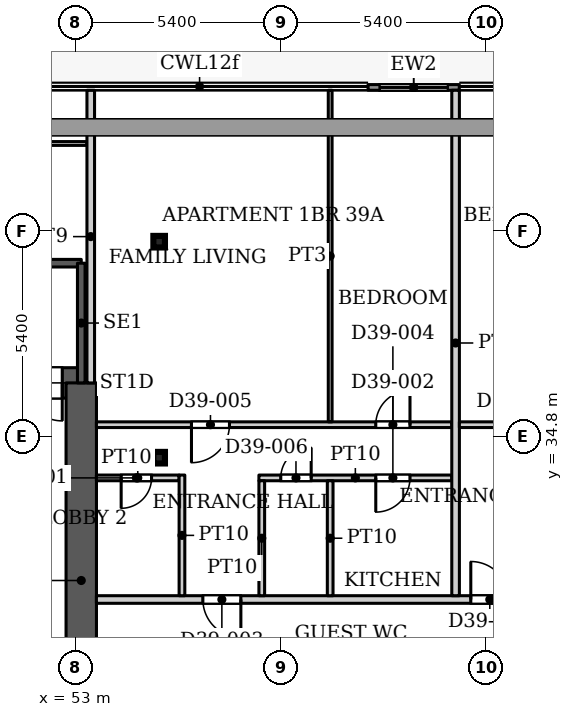
"""IFC4 building model, lengths in metres.
Left out: names, types, materials, properties, quantities, classifications, styles, units other than length and angle.
Written with IfcOpenShell. Run it as: python <this file> out.ifc"""

import sys

from ifc_helpers import new_model, si_unit, direction, frame, frame_2d, origin, origin_2d, place, context, subcontext, project, spatial, rectangle, hollow_rectangle, extrude, source, transform, mapped, element, fill, save


model = new_model("IFC4")
c1 = context("Model", 3, precision=1e-05, world=origin(), true_north=direction((0.0, 1.0)))
c2 = subcontext(c1, "Body", "Model", "MODEL_VIEW")
j1 = project(units=[si_unit("LENGTHUNIT", "METRE"), si_unit("PLANEANGLEUNIT", "RADIAN")], contexts=[c1])
p1 = place(None, origin())
s1 = spatial("IfcSite", under=j1, at=p1, CompositionType="ELEMENT")
p2 = place(p1, origin())
s2 = spatial("IfcBuilding", under=s1, at=p2, CompositionType="ELEMENT")
p3 = place(p2, frame((0.0, 0.0, 168.2)))
s3 = spatial("IfcBuildingStorey", under=s2, at=p3, CompositionType="ELEMENT", Elevation=168.2)
for number, where, z_axis, x_axis in (
    (1, (55.2, 34.232, 0.0), (0.0, 0.0, 1.0), (1.0, 0.0, 0.0)),
    (2, (55.2, 39.916, 0.0), (0.0, 0.0, 1.0), (1.0, 0.0, 0.0)),
):
    element("IfcColumn", number, at=place(p3, frame(where, z_axis=z_axis, x_axis=x_axis)), inside=s3, PredefinedType="COLUMN", context=c2, shape_type="SweptSolid", body=[
        extrude(hollow_rectangle(XDim=0.305, YDim=0.305, WallThickness=0.016, InnerFilletRadius=0.016, OuterFilletRadius=0.032, at=origin_2d()), origin(), (0.0, 0.0, 1.0), 3.9),
    ])
p4 = place(p3, frame((34.75, 36.2, 0.0), z_axis=(0.0, 0.0, 1.0), x_axis=(1.0, 0.0, 0.0)))
e3 = element("IfcWall", 3, at=p4, inside=s3, PredefinedType="SHEAR", context=c2, shape_type="SweptSolid", body=[
    extrude(rectangle(XDim=18.4, YDim=0.8, at=frame_2d((9.2, 0.0))), origin(), (0.0, 0.0, 1.0), 3.9),
])
p5 = place(p4, frame((16.9, 0.0, 0.0)))
e4 = element("IfcOpeningElement", 4, at=p5, cuts=e3, PredefinedType="OPENING", context=c2, shape_type="SweptSolid", body=[
    extrude(rectangle(XDim=1.0, YDim=2.2, at=frame_2d((0.5, 1.1))), frame((0.0, 0.41, 0.0), z_axis=(0.0, -1.0, 0.0), x_axis=(1.0, 0.0, 0.0)), (0.0, 0.0, 1.0), 0.82),
])
p6 = place(p3, frame((53.15, 25.8, 0.0), z_axis=(0.0, 0.0, 1.0), x_axis=(0.0, 1.0, 0.0)))
e5 = element("IfcWall", 5, at=p6, inside=s3, PredefinedType="SHEAR", context=c2, shape_type="SweptSolid", body=[
    extrude(rectangle(XDim=10.4, YDim=0.8, at=frame_2d((5.2, 0.0))), origin(), (0.0, 0.0, 1.0), 3.9),
])
p7 = place(p3, frame((60.697, 43.975, 0.0), z_axis=(0.0, 0.0, 1.0), x_axis=(1.0, 0.0, 0.0)))
e6 = element("IfcWall", 6, at=p7, inside=s3, PredefinedType="SOLIDWALL", context=c2, shape_type="SweptSolid", body=[
    extrude(rectangle(XDim=2.4, YDim=0.15, at=frame_2d((1.2, 0.0))), origin(), (0.0, 0.0, 1.0), 3.75),
])
p8 = place(p7, frame((0.3, 0.0, 0.0)))
e7 = element("IfcOpeningElement", 7, at=p8, cuts=e6, PredefinedType="OPENING", context=c2, shape_type="SweptSolid", body=[
    extrude(rectangle(XDim=1.8, YDim=2.4, at=frame_2d((0.9, 1.2))), frame((0.0, 0.085, 0.0), z_axis=(0.0, -1.0, 0.0), x_axis=(1.0, 0.0, 0.0)), (0.0, 0.0, 1.0), 0.17),
])
p9 = place(p3, frame((43.99, 39.35, 0.0), z_axis=(0.0, 0.0, 1.0), x_axis=(1.0, 0.0, 0.0)))
e8 = element("IfcWall", 8, at=p9, inside=s3, PredefinedType="SHEAR", context=c2, shape_type="SweptSolid", body=[
    extrude(rectangle(XDim=9.16, YDim=0.2, at=frame_2d((4.58, 0.0))), origin(), (0.0, 0.0, 1.0), 3.9),
])
p10 = place(p3, frame((53.15, 36.2, 0.0), z_axis=(0.0, 0.0, 1.0), x_axis=(0.0, 1.0, 0.0)))
e9 = element("IfcWall", 9, at=p10, inside=s3, PredefinedType="SHEAR", context=c2, shape_type="SweptSolid", body=[
    extrude(rectangle(XDim=3.15, YDim=0.2, at=frame_2d((1.575, 0.0))), origin(), (0.0, 0.0, 1.0), 3.9),
])
p11 = place(p3, frame((38.399, 42.5, 0.0), z_axis=(0.0, 0.0, 1.0), x_axis=(1.0, 0.0, 0.0)))
e10 = element("IfcWall", 10, at=p11, inside=s3, PredefinedType="PARTITIONING", context=c2, shape_type="SweptSolid", body=[
    extrude(rectangle(XDim=14.901, YDim=0.1, at=frame_2d((7.451, 0.0))), origin(), (0.0, 0.0, 1.0), 3.6),
])
p12 = place(p11, frame((6.801, 0.0, 0.0)))
e11 = element("IfcOpeningElement", 11, at=p12, cuts=e10, PredefinedType="OPENING", context=c2, shape_type="SweptSolid", body=[
    extrude(rectangle(XDim=1.0, YDim=2.1, at=frame_2d((0.5, 1.05))), frame((0.0, 0.06, 0.0), z_axis=(0.0, -1.0, 0.0), x_axis=(1.0, 0.0, 0.0)), (0.0, 0.0, 1.0), 0.12),
])
p13 = place(p3, frame((53.4, 36.199, 0.0), z_axis=(0.0, 0.0, 1.0), x_axis=(0.0, 1.0, 0.0)))
e12 = element("IfcWall", 12, at=p13, inside=s3, PredefinedType="PARTITIONING", context=c2, shape_type="SweptSolid", body=[
    extrude(rectangle(XDim=7.701, YDim=0.2, at=frame_2d((3.851, 0.0))), origin(), (0.0, 0.0, 1.0), 3.6),
])
p14 = place(p3, frame((53.549, 30.5, 0.0), z_axis=(0.0, 0.0, 1.0), x_axis=(1.0, 0.0, 0.0)))
e13 = element("IfcWall", 13, at=p14, inside=s3, PredefinedType="PARTITIONING", context=c2, shape_type="SweptSolid", body=[
    extrude(rectangle(XDim=39.151, YDim=0.2, at=frame_2d((19.575, 0.0))), origin(), (0.0, 0.0, 1.0), 3.6),
])
p15 = place(p14, frame((2.801, 0.0, 0.0)))
e14 = element("IfcOpeningElement", 14, at=p15, cuts=e13, PredefinedType="OPENING", context=c2, shape_type="SweptSolid", body=[
    extrude(rectangle(XDim=1.0, YDim=2.1, at=frame_2d((0.5, 1.05))), frame((0.0, 0.11, 0.0), z_axis=(0.0, -1.0, 0.0), x_axis=(1.0, 0.0, 0.0)), (0.0, 0.0, 1.0), 0.22),
])
p16 = place(p14, frame((9.851, 0.0, 0.0)))
e15 = element("IfcOpeningElement", 15, at=p16, cuts=e13, PredefinedType="OPENING", context=c2, shape_type="SweptSolid", body=[
    extrude(rectangle(XDim=1.0, YDim=2.1, at=frame_2d((0.5, 1.05))), frame((0.0, 0.11, 0.0), z_axis=(0.0, -1.0, 0.0), x_axis=(1.0, 0.0, 0.0)), (0.0, 0.0, 1.0), 0.22),
])
p17 = place(p14, frame((28.751, 0.0, 0.0)))
e16 = element("IfcOpeningElement", 16, at=p17, cuts=e13, PredefinedType="OPENING", context=c2, shape_type="SweptSolid", body=[
    extrude(rectangle(XDim=1.0, YDim=2.1, at=frame_2d((0.5, 1.05))), frame((0.0, 0.11, 0.0), z_axis=(0.0, -1.0, 0.0), x_axis=(1.0, 0.0, 0.0)), (0.0, 0.0, 1.0), 0.22),
])
p18 = place(p14, frame((32.651, 0.0, 0.0)))
e17 = element("IfcOpeningElement", 17, at=p18, cuts=e13, PredefinedType="OPENING", context=c2, shape_type="SweptSolid", body=[
    extrude(rectangle(XDim=1.0, YDim=2.1, at=frame_2d((0.5, 1.05))), frame((0.0, 0.11, 0.0), z_axis=(0.0, -1.0, 0.0), x_axis=(1.0, 0.0, 0.0)), (0.0, 0.0, 1.0), 0.22),
])
p19 = place(p3, frame((53.549, 33.7, 0.0), z_axis=(0.0, 0.0, 1.0), x_axis=(1.0, 0.0, 0.0)))
e18 = element("IfcWall", 18, at=p19, inside=s3, PredefinedType="PARTITIONING", context=c2, shape_type="SweptSolid", body=[
    extrude(rectangle(XDim=2.176, YDim=0.15, at=frame_2d((1.088, 0.0))), origin(), (0.0, 0.0, 1.0), 3.6),
])
p20 = place(p19, frame((0.651, 0.0, 0.0)))
e19 = element("IfcOpeningElement", 19, at=p20, cuts=e18, PredefinedType="OPENING", context=c2, shape_type="SweptSolid", body=[
    extrude(rectangle(XDim=0.8, YDim=2.1, at=frame_2d((0.4, 1.05))), frame((0.0, 0.085, 0.0), z_axis=(0.0, -1.0, 0.0), x_axis=(1.0, 0.0, 0.0)), (0.0, 0.0, 1.0), 0.17),
])
p21 = place(p3, frame((53.549, 35.1, 0.0), z_axis=(0.0, 0.0, 1.0), x_axis=(1.0, 0.0, 0.0)))
e20 = element("IfcWall", 20, at=p21, inside=s3, PredefinedType="PARTITIONING", context=c2, shape_type="SweptSolid", body=[
    extrude(rectangle(XDim=9.351, YDim=0.15, at=frame_2d((4.675, 0.0))), origin(), (0.0, 0.0, 1.0), 3.6),
])
p22 = place(p21, frame((7.351, 0.0, 0.0)))
e21 = element("IfcOpeningElement", 21, at=p22, cuts=e20, PredefinedType="OPENING", context=c2, shape_type="SweptSolid", body=[
    extrude(rectangle(XDim=0.9, YDim=2.1, at=frame_2d((0.45, 1.05))), frame((0.0, 0.085, 0.0), z_axis=(0.0, -1.0, 0.0), x_axis=(1.0, 0.0, 0.0)), (0.0, 0.0, 1.0), 0.17),
])
p23 = place(p21, frame((2.501, 0.0, 0.0)))
e22 = element("IfcOpeningElement", 22, at=p23, cuts=e20, PredefinedType="OPENING", context=c2, shape_type="SweptSolid", body=[
    extrude(rectangle(XDim=1.0, YDim=2.1, at=frame_2d((0.5, 1.05))), frame((0.0, 0.085, 0.0), z_axis=(0.0, -1.0, 0.0), x_axis=(1.0, 0.0, 0.0)), (0.0, 0.0, 1.0), 0.17),
])
p24 = place(p3, frame((55.8, 30.6, 0.0), z_axis=(0.0, 0.0, 1.0), x_axis=(0.0, 1.0, 0.0)))
e23 = element("IfcWall", 23, at=p24, inside=s3, PredefinedType="PARTITIONING", context=c2, shape_type="SweptSolid", body=[
    extrude(rectangle(XDim=3.175, YDim=0.15, at=frame_2d((1.587, 0.0))), origin(), (0.0, 0.0, 1.0), 3.6),
])
p25 = place(p3, frame((57.825, 33.7, 0.0), z_axis=(0.0, 0.0, 1.0), x_axis=(1.0, 0.0, 0.0)))
e24 = element("IfcWall", 24, at=p25, inside=s3, PredefinedType="PARTITIONING", context=c2, shape_type="SweptSolid", body=[
    extrude(rectangle(XDim=5.075, YDim=0.15, at=frame_2d((2.538, 0.0))), origin(), (0.0, 0.0, 1.0), 3.6),
])
p26 = place(p25, frame((3.075, 0.0, 0.0)))
e25 = element("IfcOpeningElement", 25, at=p26, cuts=e24, PredefinedType="OPENING", context=c2, shape_type="SweptSolid", body=[
    extrude(rectangle(XDim=0.9, YDim=2.1, at=frame_2d((0.45, 1.05))), frame((0.0, 0.085, 0.0), z_axis=(0.0, -1.0, 0.0), x_axis=(1.0, 0.0, 0.0)), (0.0, 0.0, 1.0), 0.17),
])
p27 = place(p25, frame((0.575, 0.0, 0.0)))
e26 = element("IfcOpeningElement", 26, at=p27, cuts=e24, PredefinedType="OPENING", context=c2, shape_type="SweptSolid", body=[
    extrude(rectangle(XDim=0.8, YDim=2.1, at=frame_2d((0.4, 1.05))), frame((0.0, 0.085, 0.0), z_axis=(0.0, -1.0, 0.0), x_axis=(1.0, 0.0, 0.0)), (0.0, 0.0, 1.0), 0.17),
])
for number, where, z_axis, x_axis in (
    (27, (57.9, 30.6, 0.0), (0.0, 0.0, 1.0), (0.0, 1.0, 0.0)),
    (28, (59.7, 30.6, 0.0), (0.0, 0.0, 1.0), (0.0, 1.0, 0.0)),
):
    element("IfcWall", number, at=place(p3, frame(where, z_axis=z_axis, x_axis=x_axis)), inside=s3, PredefinedType="PARTITIONING", context=c2, shape_type="SweptSolid", body=[
        extrude(rectangle(XDim=3.025, YDim=0.15, at=frame_2d((1.512, 0.0))), origin(), (0.0, 0.0, 1.0), 3.6),
    ])
p28 = place(p3, frame((59.7, 35.175, 0.0), z_axis=(0.0, 0.0, 1.0), x_axis=(0.0, 1.0, 0.0)))
e29 = element("IfcWall", 29, at=p28, inside=s3, PredefinedType="PARTITIONING", context=c2, shape_type="SweptSolid", body=[
    extrude(rectangle(XDim=8.725, YDim=0.1, at=frame_2d((4.362, 0.0))), origin(), (0.0, 0.0, 1.0), 3.6),
])
p29 = place(p3, frame((63.0, 30.6, 0.0), z_axis=(0.0, 0.0, 1.0), x_axis=(0.0, 1.0, 0.0)))
e30 = element("IfcWall", 30, at=p29, inside=s3, PredefinedType="PARTITIONING", context=c2, shape_type="SweptSolid", body=[
    extrude(rectangle(XDim=13.3, YDim=0.2, at=frame_2d((6.65, 0.0))), origin(), (0.0, 0.0, 1.0), 3.6),
])
p30 = place(p3, frame((63.1, 35.1, 0.0), z_axis=(0.0, 0.0, 1.0), x_axis=(1.0, 0.0, 0.0)))
e31 = element("IfcWall", 31, at=p30, inside=s3, PredefinedType="PARTITIONING", context=c2, shape_type="SweptSolid", body=[
    extrude(rectangle(XDim=12.1, YDim=0.15, at=frame_2d((6.05, 0.0))), origin(), (0.0, 0.0, 1.0), 3.6),
])
p31 = place(p30, frame((1.1, 0.0, 0.0)))
e32 = element("IfcOpeningElement", 32, at=p31, cuts=e31, PredefinedType="OPENING", context=c2, shape_type="SweptSolid", body=[
    extrude(rectangle(XDim=0.9, YDim=2.1, at=frame_2d((0.45, 1.05))), frame((0.0, 0.085, 0.0), z_axis=(0.0, -1.0, 0.0), x_axis=(1.0, 0.0, 0.0)), (0.0, 0.0, 1.0), 0.17),
])
p32 = place(p30, frame((5.1, 0.0, 0.0)))
e33 = element("IfcOpeningElement", 33, at=p32, cuts=e31, PredefinedType="OPENING", context=c2, shape_type="SweptSolid", body=[
    extrude(rectangle(XDim=1.0, YDim=2.1, at=frame_2d((0.5, 1.05))), frame((0.0, 0.085, 0.0), z_axis=(0.0, -1.0, 0.0), x_axis=(1.0, 0.0, 0.0)), (0.0, 0.0, 1.0), 0.17),
])
p33 = place(p30, frame((8.6, 0.0, 0.0)))
e34 = element("IfcOpeningElement", 34, at=p33, cuts=e31, PredefinedType="OPENING", context=c2, shape_type="SweptSolid", body=[
    extrude(rectangle(XDim=0.9, YDim=2.1, at=frame_2d((0.45, 1.05))), frame((0.0, 0.085, 0.0), z_axis=(0.0, -1.0, 0.0), x_axis=(1.0, 0.0, 0.0)), (0.0, 0.0, 1.0), 0.17),
])
m1 = source(origin(), c2, "Body", "SweptSolid", [
    extrude(rectangle(XDim=1.8, YDim=2.4, at=frame_2d((0.9, 1.2))), frame((0.0, 0.025, 0.0), z_axis=(0.0, -1.0, 0.0), x_axis=(1.0, 0.0, 0.0)), (0.0, 0.0, 1.0), 0.05),
])
p34 = place(p8, origin())
e35 = element("IfcDoor", 35, at=p34, inside=s3, OperationType="SLIDING_TO_LEFT", PredefinedType="DOOR", context=c2, shape_type="MappedRepresentation", body=[
    mapped(m1, transform((0.0, 0.0, 0.0), x_axis=(1.0, 0.0, 0.0), y_axis=(0.0, 1.0, 0.0), z_axis=(0.0, 0.0, 1.0), scale=1.0)),
])
fill(e7, e35)
m2 = source(origin(), c2, "Body", "SweptSolid", [
    extrude(rectangle(XDim=1.0, YDim=2.2, at=frame_2d((0.5, 1.1))), frame((0.0, 0.025, 0.0), z_axis=(0.0, -1.0, 0.0), x_axis=(1.0, 0.0, 0.0)), (0.0, 0.0, 1.0), 0.05),
])
p35 = place(p5, origin())
e36 = element("IfcDoor", 36, at=p35, inside=s3, OperationType="SINGLE_SWING_RIGHT", PredefinedType="DOOR", context=c2, shape_type="MappedRepresentation", body=[
    mapped(m2, transform((0.0, 0.0, 0.0), x_axis=(1.0, 0.0, 0.0), y_axis=(0.0, 1.0, 0.0), z_axis=(0.0, 0.0, 1.0), scale=1.0)),
])
fill(e4, e36)
m3 = source(origin(), c2, "Body", "SweptSolid", [
    extrude(rectangle(XDim=0.8, YDim=2.1, at=frame_2d((0.4, 1.05))), frame((0.0, 0.025, 0.0), z_axis=(0.0, -1.0, 0.0), x_axis=(1.0, 0.0, 0.0)), (0.0, 0.0, 1.0), 0.05),
])
p36 = place(p20, origin())
e37 = element("IfcDoor", 37, at=p36, inside=s3, OperationType="SINGLE_SWING_RIGHT", PredefinedType="DOOR", context=c2, shape_type="MappedRepresentation", body=[
    mapped(m3, transform((0.0, 0.0, 0.0), x_axis=(1.0, 0.0, 0.0), y_axis=(0.0, 1.0, 0.0), z_axis=(0.0, 0.0, 1.0), scale=1.0)),
])
fill(e19, e37)
m4 = source(origin(), c2, "Body", "SweptSolid", [
    extrude(rectangle(XDim=0.9, YDim=2.1, at=frame_2d((0.45, 1.05))), frame((0.0, 0.025, 0.0), z_axis=(0.0, -1.0, 0.0), x_axis=(1.0, 0.0, 0.0)), (0.0, 0.0, 1.0), 0.05),
])
p37 = place(p22, origin())
e38 = element("IfcDoor", 38, at=p37, inside=s3, OperationType="SINGLE_SWING_LEFT", PredefinedType="DOOR", context=c2, shape_type="MappedRepresentation", body=[
    mapped(m4, transform((0.0, 0.0, 0.0), x_axis=(1.0, 0.0, 0.0), y_axis=(0.0, 1.0, 0.0), z_axis=(0.0, 0.0, 1.0), scale=1.0)),
])
fill(e21, e38)
m5 = source(origin(), c2, "Body", "SweptSolid", [
    extrude(rectangle(XDim=1.0, YDim=2.1, at=frame_2d((0.5, 1.05))), frame((0.0, 0.025, 0.0), z_axis=(0.0, -1.0, 0.0), x_axis=(1.0, 0.0, 0.0)), (0.0, 0.0, 1.0), 0.05),
])
p38 = place(p15, origin())
e39 = element("IfcDoor", 39, at=p38, inside=s3, OperationType="SINGLE_SWING_RIGHT", PredefinedType="DOOR", context=c2, shape_type="MappedRepresentation", body=[
    mapped(m5, transform((0.0, 0.0, 0.0), x_axis=(1.0, 0.0, 0.0), y_axis=(0.0, 1.0, 0.0), z_axis=(0.0, 0.0, 1.0), scale=1.0)),
])
fill(e14, e39)
p39 = place(p26, origin())
e40 = element("IfcDoor", 40, at=p39, inside=s3, OperationType="SINGLE_SWING_RIGHT", PredefinedType="DOOR", context=c2, shape_type="MappedRepresentation", body=[
    mapped(m4, transform((0.0, 0.0, 0.0), x_axis=(1.0, 0.0, 0.0), y_axis=(0.0, 1.0, 0.0), z_axis=(0.0, 0.0, 1.0), scale=1.0)),
])
fill(e25, e40)
m6 = source(origin(), c2, "Body", "SweptSolid", [
    extrude(rectangle(XDim=1.0, YDim=2.1, at=frame_2d((0.5, 1.05))), frame((0.0, 0.025, 0.0), z_axis=(0.0, -1.0, 0.0), x_axis=(1.0, 0.0, 0.0)), (0.0, 0.0, 1.0), 0.05),
])
p40 = place(p23, origin())
e41 = element("IfcDoor", 41, at=p40, inside=s3, OperationType="SINGLE_SWING_RIGHT", PredefinedType="DOOR", context=c2, shape_type="MappedRepresentation", body=[
    mapped(m6, transform((0.0, 0.0, 0.0), x_axis=(1.0, 0.0, 0.0), y_axis=(0.0, 1.0, 0.0), z_axis=(0.0, 0.0, 1.0), scale=1.0)),
])
fill(e22, e41)
p41 = place(p27, origin())
e42 = element("IfcDoor", 42, at=p41, inside=s3, OperationType="SINGLE_SWING_LEFT", PredefinedType="DOOR", context=c2, shape_type="MappedRepresentation", body=[
    mapped(m3, transform((0.0, 0.0, 0.0), x_axis=(1.0, 0.0, 0.0), y_axis=(0.0, 1.0, 0.0), z_axis=(0.0, 0.0, 1.0), scale=1.0)),
])
fill(e26, e42)
p42 = place(p16, origin())
e43 = element("IfcDoor", 43, at=p42, inside=s3, OperationType="SINGLE_SWING_LEFT", PredefinedType="DOOR", context=c2, shape_type="MappedRepresentation", body=[
    mapped(m5, transform((0.0, 0.0, 0.0), x_axis=(1.0, 0.0, 0.0), y_axis=(0.0, 1.0, 0.0), z_axis=(0.0, 0.0, 1.0), scale=1.0)),
])
fill(e15, e43)
save(model, sys.argv[1])
